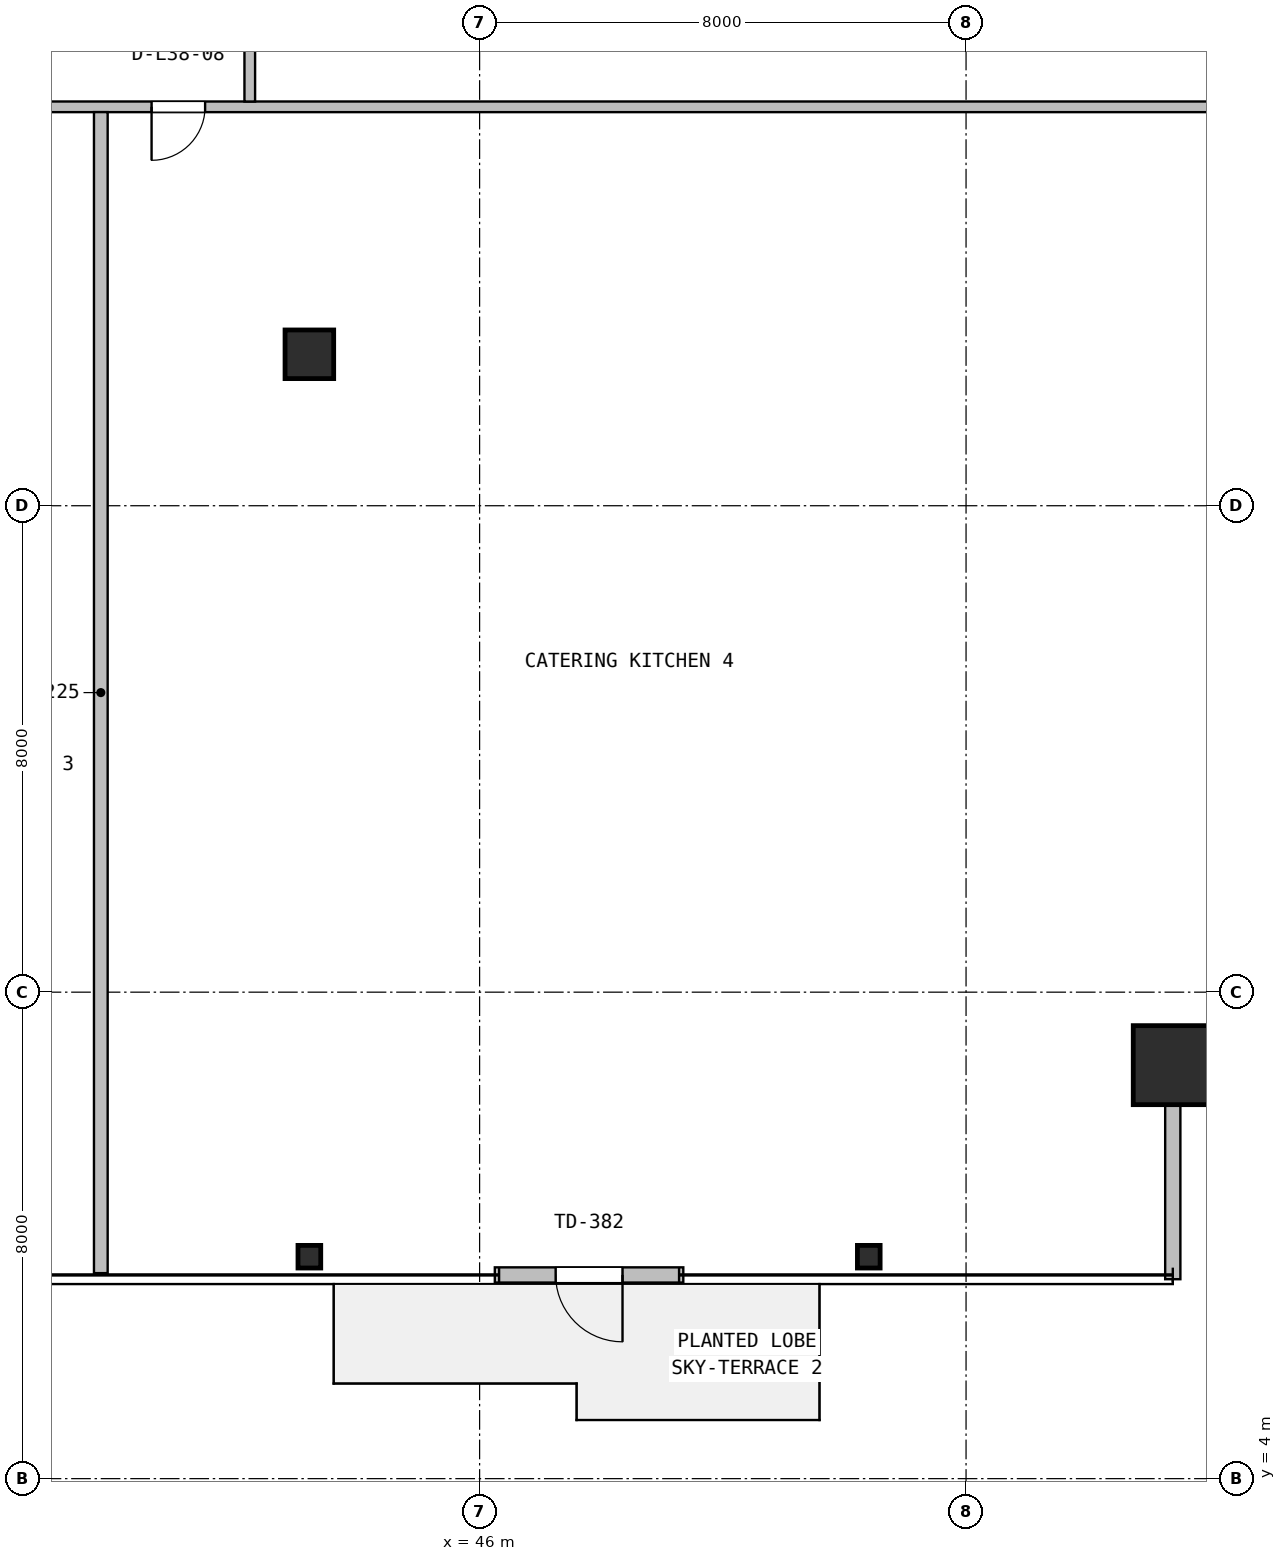
"""IFC4 building model, lengths in metres.
Left out: names, types, materials, properties, quantities, classifications, styles, units other than length and angle.
Written with IfcOpenShell. Run it as: python <this file> out.ifc"""

import sys

from ifc_helpers import new_model, si_unit, direction, frame, frame_2d, origin, origin_2d, place, context, subcontext, project, spatial, rectangle, hollow_rectangle, i_section, extrude, source, transform, mapped, element, fill, save


model = new_model("IFC4")
c1 = context("Model", 3, precision=1e-05, world=origin(), true_north=direction((0.0, 1.0)))
c2 = subcontext(c1, "Body", "Model", "MODEL_VIEW")
j1 = project(units=[si_unit("LENGTHUNIT", "METRE"), si_unit("PLANEANGLEUNIT", "RADIAN")], contexts=[c1])
p1 = place(None, origin())
s1 = spatial("IfcSite", under=j1, at=p1, CompositionType="ELEMENT")
p2 = place(p1, origin())
s2 = spatial("IfcBuilding", under=s1, at=p2, CompositionType="ELEMENT")
p3 = place(p2, frame((0.0, 0.0, 157.2)))
s3 = spatial("IfcBuildingStorey", under=s2, at=p3, CompositionType="ELEMENT", Elevation=157.2)
m1 = source(origin(), c2, "Body", "SweptSolid", [
    extrude(hollow_rectangle(XDim=1.3, YDim=1.3, WallThickness=0.05, at=origin_2d()), origin(), (0.0, 0.0, 1.0), 3.8),
])
p4 = place(p3, frame((57.4, 10.8, 0.0), z_axis=(0.0, 0.0, 1.0), x_axis=(1.0, 0.0, 0.0)))
e1 = element("IfcColumn", 1, at=p4, inside=s3, PredefinedType="COLUMN", context=c2, shape_type="MappedRepresentation", body=[
    mapped(m1, transform((0.0, 0.0, 0.0), x_axis=(1.0, 0.0, 0.0), y_axis=(0.0, 1.0, 0.0), z_axis=(0.0, 0.0, 1.0), scale=1.0)),
])
m2 = source(origin(), c2, "Body", "SweptSolid", [
    extrude(i_section(OverallWidth=0.374, OverallDepth=0.372, WebThickness=0.016, FlangeThickness=0.026, FilletRadius=0.016, at=origin_2d()), origin(), (0.0, 0.0, 1.0), 3.8),
])
for number, where, z_axis, x_axis in (
    (2, (43.2, 7.65, 0.0), (0.0, 0.0, 1.0), (1.0, 0.0, 0.0)),
    (3, (52.4, 7.65, 0.0), (0.0, 0.0, 1.0), (1.0, 0.0, 0.0)),
):
    element("IfcColumn", number, at=place(p3, frame(where, z_axis=z_axis, x_axis=x_axis)), inside=s3, PredefinedType="COLUMN", context=c2, shape_type="MappedRepresentation", body=[
        mapped(m2, transform((0.0, 0.0, 0.0), x_axis=(1.0, 0.0, 0.0), y_axis=(0.0, 1.0, 0.0), z_axis=(0.0, 0.0, 1.0), scale=1.0)),
    ])
m3 = source(origin(), c2, "Body", "SweptSolid", [
    extrude(rectangle(XDim=0.8, YDim=0.8, at=origin_2d()), origin(), (0.0, 0.0, 1.0), 3.8),
])
p5 = place(p3, frame((43.2, 22.49, 0.0), z_axis=(0.0, 0.0, 1.0), x_axis=(1.0, 0.0, 0.0)))
e4 = element("IfcColumn", 4, at=p5, inside=s3, PredefinedType="COLUMN", context=c2, shape_type="MappedRepresentation", body=[
    mapped(m3, transform((0.0, 0.0, 0.0), x_axis=(1.0, 0.0, 0.0), y_axis=(0.0, 1.0, 0.0), z_axis=(0.0, 0.0, 1.0), scale=1.0)),
])
p6 = place(p3, frame((46.25, 7.35, 0.0), z_axis=(0.0, 0.0, 1.0), x_axis=(1.0, 0.0, 0.0)))
e5 = element("IfcWall", 5, at=p6, inside=s3, PredefinedType="SOLIDWALL", context=c2, shape_type="SweptSolid", body=[
    extrude(rectangle(XDim=3.1, YDim=0.25, at=frame_2d((1.55, 0.0))), origin(), (0.0, 0.0, 1.0), 3.53),
])
p7 = place(p6, frame((1.0, 0.0, 0.0)))
e6 = element("IfcOpeningElement", 6, at=p7, cuts=e5, PredefinedType="OPENING", context=c2, shape_type="SweptSolid", body=[
    extrude(rectangle(XDim=1.1, YDim=2.15, at=frame_2d((0.55, 1.075))), frame((0.0, 0.135, 0.0), z_axis=(0.0, -1.0, 0.0), x_axis=(1.0, 0.0, 0.0)), (0.0, 0.0, 1.0), 0.27),
])
p8 = place(p3, frame((57.4, 7.28, 0.0), z_axis=(0.0, 0.0, 1.0), x_axis=(0.0, 1.0, 0.0)))
e7 = element("IfcWall", 7, at=p8, inside=s3, PredefinedType="SOLIDWALL", context=c2, shape_type="SweptSolid", body=[
    extrude(rectangle(XDim=3.6, YDim=0.25, at=frame_2d((1.8, 0.0))), origin(), (0.0, 0.0, 1.0), 3.108),
])
p9 = place(p3, frame((7.18, 26.56, 0.0), z_axis=(0.0, 0.0, 1.0), x_axis=(1.0, 0.0, 0.0)))
e8 = element("IfcWall", 8, at=p9, inside=s3, PredefinedType="PARTITIONING", context=c2, shape_type="SweptSolid", body=[
    extrude(rectangle(XDim=53.64, YDim=0.175, at=frame_2d((26.82, 0.0))), origin(), (0.0, 0.0, 1.0), 2.909),
])
p10 = place(p9, frame((21.4, 0.0, 0.0)))
e9 = element("IfcOpeningElement", 9, at=p10, cuts=e8, PredefinedType="OPENING", context=c2, shape_type="SweptSolid", body=[
    extrude(rectangle(XDim=1.05, YDim=2.1, at=frame_2d((0.525, 1.05))), frame((0.0, 0.098, 0.0), z_axis=(0.0, -1.0, 0.0), x_axis=(1.0, 0.0, 0.0)), (0.0, 0.0, 1.0), 0.195),
])
p11 = place(p9, frame((25.205, 0.0, 0.0)))
e10 = element("IfcOpeningElement", 10, at=p11, cuts=e8, PredefinedType="OPENING", context=c2, shape_type="SweptSolid", body=[
    extrude(rectangle(XDim=1.05, YDim=2.1, at=frame_2d((0.525, 1.05))), frame((0.0, 0.098, 0.0), z_axis=(0.0, -1.0, 0.0), x_axis=(1.0, 0.0, 0.0)), (0.0, 0.0, 1.0), 0.195),
])
p12 = place(p9, frame((29.825, 0.0, 0.0)))
e11 = element("IfcOpeningElement", 11, at=p12, cuts=e8, PredefinedType="OPENING", context=c2, shape_type="SweptSolid", body=[
    extrude(rectangle(XDim=1.4, YDim=2.12, at=frame_2d((0.7, 1.06))), frame((0.0, 0.098, 0.0), z_axis=(0.0, -1.0, 0.0), x_axis=(1.0, 0.0, 0.0)), (0.0, 0.0, 1.0), 0.195),
])
p13 = place(p9, frame((33.425, 0.0, 0.0)))
e12 = element("IfcOpeningElement", 12, at=p13, cuts=e8, PredefinedType="OPENING", context=c2, shape_type="SweptSolid", body=[
    extrude(rectangle(XDim=0.88, YDim=2.06, at=frame_2d((0.44, 1.03))), frame((0.0, 0.098, 0.0), z_axis=(0.0, -1.0, 0.0), x_axis=(1.0, 0.0, 0.0)), (0.0, 0.0, 1.0), 0.195),
])
p14 = place(p3, frame((39.77, 7.38, 0.0), z_axis=(0.0, 0.0, 1.0), x_axis=(0.0, 1.0, 0.0)))
e13 = element("IfcWall", 13, at=p14, inside=s3, PredefinedType="PARTITIONING", context=c2, shape_type="SweptSolid", body=[
    extrude(rectangle(XDim=19.093, YDim=0.225, at=frame_2d((9.546, 0.0))), origin(), (0.0, 0.0, 1.0), 2.909),
])
p15 = place(p3, frame((42.22, 26.647, 0.0), z_axis=(0.0, 0.0, 1.0), x_axis=(0.0, 1.0, 0.0)))
e14 = element("IfcWall", 14, at=p15, inside=s3, PredefinedType="PARTITIONING", context=c2, shape_type="SweptSolid", body=[
    extrude(rectangle(XDim=6.616, YDim=0.175, at=frame_2d((3.308, 0.0))), origin(), (0.0, 0.0, 1.0), 3.222),
])
m4 = source(origin(), c2, "Body", "SweptSolid", [
    extrude(rectangle(XDim=1.1, YDim=2.15, at=frame_2d((0.55, 1.075))), frame((0.0, 0.025, 0.0), z_axis=(0.0, -1.0, 0.0), x_axis=(1.0, 0.0, 0.0)), (0.0, 0.0, 1.0), 0.05),
])
p16 = place(p7, frame((1.1, 0.0, 0.0), z_axis=(0.0, 0.0, 1.0), x_axis=(-1.0, 0.0, 0.0)))
e15 = element("IfcDoor", 15, at=p16, inside=s3, OperationType="SINGLE_SWING_RIGHT", PredefinedType="DOOR", context=c2, shape_type="MappedRepresentation", body=[
    mapped(m4, transform((0.0, 0.0, 0.0), x_axis=(1.0, 0.0, 0.0), y_axis=(0.0, 1.0, 0.0), z_axis=(0.0, 0.0, 1.0), scale=1.0)),
])
fill(e6, e15)
m5 = source(origin(), c2, "Body", "SweptSolid", [
    extrude(rectangle(XDim=0.88, YDim=2.06, at=frame_2d((0.44, 1.03))), frame((0.0, 0.025, 0.0), z_axis=(0.0, -1.0, 0.0), x_axis=(1.0, 0.0, 0.0)), (0.0, 0.0, 1.0), 0.05),
])
p17 = place(p13, frame((0.88, 0.0, 0.0), z_axis=(0.0, 0.0, 1.0), x_axis=(-1.0, 0.0, 0.0)))
e16 = element("IfcDoor", 16, at=p17, inside=s3, OperationType="SINGLE_SWING_LEFT", PredefinedType="DOOR", context=c2, shape_type="MappedRepresentation", body=[
    mapped(m5, transform((0.0, 0.0, 0.0), x_axis=(1.0, 0.0, 0.0), y_axis=(0.0, 1.0, 0.0), z_axis=(0.0, 0.0, 1.0), scale=1.0)),
])
fill(e12, e16)
save(model, sys.argv[1])
